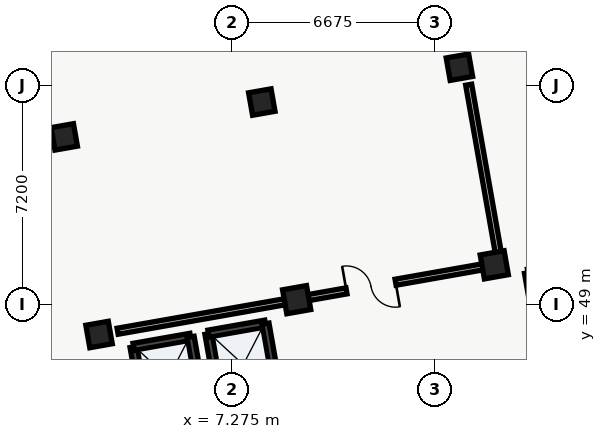
"""IFC4 building model, lengths in metres.
Left out: names, types, materials, properties, quantities, classifications, styles, units other than length and angle.
Written with IfcOpenShell. Run it as: python <this file> out.ifc"""

import sys

from ifc_helpers import new_model, si_unit, direction, frame, frame_2d, origin, origin_2d, place, context, subcontext, project, spatial, rectangle, extrude, element, fill, save


model = new_model("IFC4")
c1 = context("Model", 3, precision=1e-05, world=origin(), true_north=direction((0.0, 1.0)))
c2 = subcontext(c1, "Body", "Model", "MODEL_VIEW")
j1 = project(units=[si_unit("LENGTHUNIT", "METRE"), si_unit("PLANEANGLEUNIT", "RADIAN")], contexts=[c1])
p1 = place(None, origin())
s1 = spatial("IfcSite", under=j1, at=p1, CompositionType="ELEMENT")
p2 = place(p1, origin())
s2 = spatial("IfcBuilding", under=s1, at=p2, CompositionType="ELEMENT")
p3 = place(p2, frame((0.0, 0.0, -4.8)))
s3 = spatial("IfcBuildingStorey", under=s2, at=p3, CompositionType="ELEMENT", Elevation=-4.8)
for number, where, z_axis, x_axis in (
    (1, (2.908, 48.01, 0.0), (0.0, 0.0, 1.0), (0.985, 0.174, 0.0)),
    (2, (1.762, 54.509, 0.0), (0.0, 0.0, 1.0), (0.985, 0.174, 0.0)),
):
    element("IfcColumn", number, at=place(p3, frame(where, z_axis=z_axis, x_axis=x_axis)), inside=s3, PredefinedType="COLUMN", context=c2, shape_type="SweptSolid", body=[
        extrude(rectangle(XDim=0.75, YDim=0.75, at=origin_2d()), origin(), (0.0, 0.0, 1.0), 4.61),
    ])
p4 = place(p3, frame((9.407, 49.156, 0.0), z_axis=(0.0, 0.0, 1.0), x_axis=(0.984807753012, 0.173648177667, 0.0)))
e3 = element("IfcColumn", 3, at=p4, inside=s3, PredefinedType="COLUMN", context=c2, shape_type="SweptSolid", body=[
    extrude(rectangle(XDim=0.8, YDim=0.8, at=origin_2d()), origin(), (0.0, 0.0, 1.0), 4.61),
])
p5 = place(p3, frame((8.261, 55.655, 0.0), z_axis=(0.0, 0.0, 1.0), x_axis=(0.984807753012, 0.173648177667, 0.0)))
e4 = element("IfcColumn", 4, at=p5, inside=s3, PredefinedType="COLUMN", context=c2, shape_type="SweptSolid", body=[
    extrude(rectangle(XDim=0.75, YDim=0.75, at=origin_2d()), origin(), (0.0, 0.0, 1.0), 4.61),
])
p6 = place(p3, frame((15.907, 50.302, 0.0), z_axis=(0.0, 0.0, 1.0), x_axis=(0.984807753012, 0.173648177667, 0.0)))
e5 = element("IfcColumn", 5, at=p6, inside=s3, PredefinedType="COLUMN", context=c2, shape_type="SweptSolid", body=[
    extrude(rectangle(XDim=0.8, YDim=0.8, at=origin_2d()), origin(), (0.0, 0.0, 1.0), 4.61),
])
p7 = place(p3, frame((14.761, 56.801, 0.0), z_axis=(0.0, 0.0, 1.0), x_axis=(0.984807753012, 0.173648177667, 0.0)))
e6 = element("IfcColumn", 6, at=p7, inside=s3, PredefinedType="COLUMN", context=c2, shape_type="SweptSolid", body=[
    extrude(rectangle(XDim=0.75, YDim=0.75, at=origin_2d()), origin(), (0.0, 0.0, 1.0), 4.61),
])
p8 = place(p3, frame((17.488, 47.382, 0.0), z_axis=(0.0, 0.0, 1.0), x_axis=(-0.173615102578, 0.98481358447, 0.0)))
e7 = element("IfcWall", 7, at=p8, inside=s3, PredefinedType="SHEAR", context=c2, shape_type="SweptSolid", body=[
    extrude(rectangle(XDim=2.7, YDim=0.24, at=frame_2d((1.35, 0.0))), origin(), (0.0, 0.0, 1.0), 4.58),
])
p9 = place(p3, frame((4.463, 45.237, 0.0), z_axis=(0.0, 0.0, 1.0), x_axis=(-0.173646056486, 0.984808127031, 0.0)))
e8 = element("IfcWall", 8, at=p9, inside=s3, PredefinedType="SHEAR", context=c2, shape_type="SweptSolid", body=[
    extrude(rectangle(XDim=2.4, YDim=0.24, at=frame_2d((1.2, 0.0))), origin(), (0.0, 0.0, 1.0), 4.58),
])
p10 = place(p3, frame((4.046, 47.601, 0.0), z_axis=(0.0, 0.0, 1.0), x_axis=(0.984793905749, 0.173726691098, 0.0)))
e9 = element("IfcWall", 9, at=p10, inside=s3, PredefinedType="SHEAR", context=c2, shape_type="SweptSolid", body=[
    extrude(rectangle(XDim=1.9, YDim=0.24, at=frame_2d((0.95, 0.0))), origin(), (0.0, 0.0, 1.0), 4.58),
])
for number, where, z_axis, x_axis in (
    (10, (5.917, 47.931, 0.0), (0.0, 0.0, 1.0), (0.174, -0.985, 0.0)),
    (11, (6.925, 45.671, 0.0), (0.0, 0.0, 1.0), (-0.174, 0.985, 0.0)),
):
    element("IfcWall", number, at=place(p3, frame(where, z_axis=z_axis, x_axis=x_axis)), inside=s3, PredefinedType="SHEAR", context=c2, shape_type="SweptSolid", body=[
        extrude(rectangle(XDim=2.4, YDim=0.24, at=frame_2d((1.2, 0.0))), origin(), (0.0, 0.0, 1.0), 4.58),
    ])
p11 = place(p3, frame((6.508, 48.035, 0.0), z_axis=(0.0, 0.0, 1.0), x_axis=(0.984793905749, 0.173726691098, 0.0)))
e12 = element("IfcWall", 12, at=p11, inside=s3, PredefinedType="SHEAR", context=c2, shape_type="SweptSolid", body=[
    extrude(rectangle(XDim=1.9, YDim=0.24, at=frame_2d((0.95, 0.0))), origin(), (0.0, 0.0, 1.0), 4.58),
])
p12 = place(p3, frame((8.379, 48.365, 0.0), z_axis=(0.0, 0.0, 1.0), x_axis=(0.173646056486, -0.984808127031, 0.0)))
e13 = element("IfcWall", 13, at=p12, inside=s3, PredefinedType="SHEAR", context=c2, shape_type="SweptSolid", body=[
    extrude(rectangle(XDim=2.4, YDim=0.24, at=frame_2d((1.2, 0.0))), origin(), (0.0, 0.0, 1.0), 4.58),
])
p13 = place(p3, frame((3.518, 48.117, 0.0), z_axis=(0.0, 0.0, 1.0), x_axis=(0.9848097689, 0.173636744608, 0.0)))
e14 = element("IfcWall", 14, at=p13, inside=s3, PredefinedType="SOLIDWALL", context=c2, shape_type="SweptSolid", body=[
    extrude(rectangle(XDim=12.56, YDim=0.2, at=frame_2d((6.28, 0.0))), origin(), (0.0, 0.0, 1.0), 3.845),
])
p14 = place(p13, frame((7.644, 0.0, 0.0)))
e15 = element("IfcOpeningElement", 15, at=p14, cuts=e14, PredefinedType="OPENING", context=c2, shape_type="SweptSolid", body=[
    extrude(rectangle(XDim=1.64, YDim=2.2, at=frame_2d((0.82, 1.1))), frame((0.0, 0.1, 0.0), z_axis=(0.0, -1.0, 0.0), x_axis=(1.0, 0.0, 0.0)), (0.0, 0.0, 1.0), 0.2),
])
p15 = place(p3, frame((16.066, 50.553, 0.0), z_axis=(0.0, 0.0, 1.0), x_axis=(-0.173649928941, 0.984807444214, 0.0)))
e16 = element("IfcWall", 16, at=p15, inside=s3, PredefinedType="SOLIDWALL", context=c2, shape_type="SweptSolid", body=[
    extrude(rectangle(XDim=5.76, YDim=0.2, at=frame_2d((2.88, 0.0))), origin(), (0.0, 0.0, 1.0), 3.945),
])
p16 = place(p14, origin())
e17 = element("IfcDoor", 17, at=p16, inside=s3, OperationType="DOUBLE_DOOR_SINGLE_SWING", PredefinedType="DOOR", context=c2, shape_type="SweptSolid", body=[
    extrude(rectangle(XDim=1.64, YDim=2.2, at=frame_2d((0.82, 1.1))), frame((0.0, 0.025, 0.0), z_axis=(0.0, -1.0, 0.0), x_axis=(1.0, 0.0, 0.0)), (0.0, 0.0, 1.0), 0.05),
])
fill(e15, e17)
save(model, sys.argv[1])
